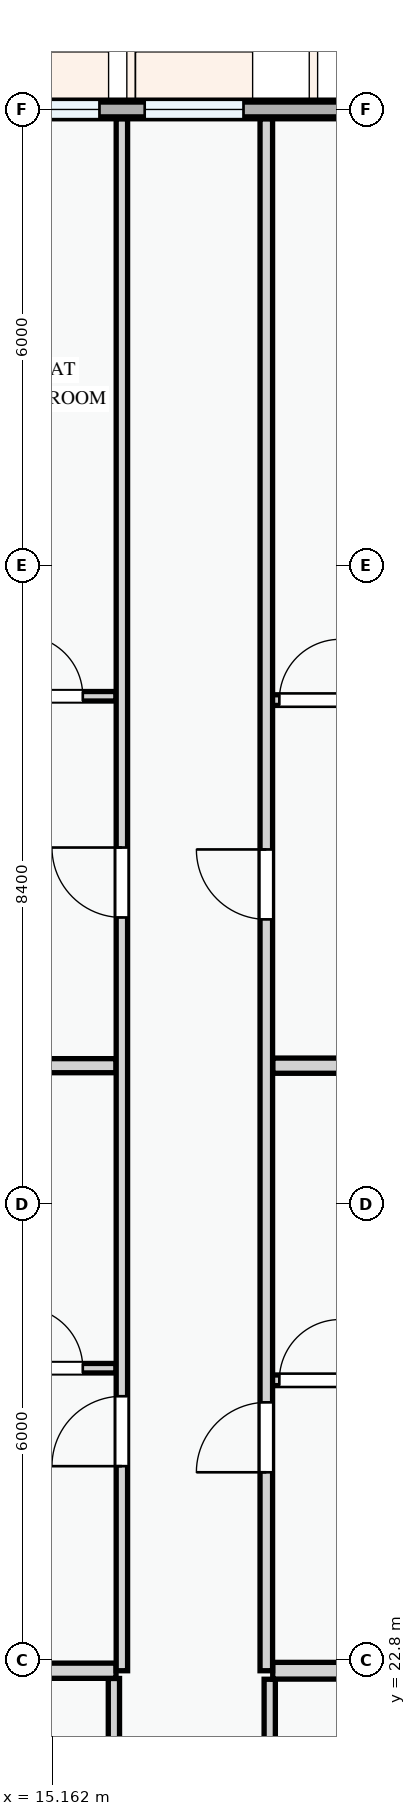
"""IFC4 building model, lengths in metres.
Left out: names, types, materials, properties, quantities, classifications, styles, units other than length and angle.
Written with IfcOpenShell. Run it as: python <this file> out.ifc"""

import sys

from ifc_helpers import new_model, si_unit, direction, frame, frame_2d, origin, place, context, subcontext, project, spatial, rectangle, extrude, element, fill, save


model = new_model("IFC4")
c1 = context("Model", 3, precision=1e-05, world=origin(), true_north=direction((0.0, 1.0)))
c2 = subcontext(c1, "Body", "Model", "MODEL_VIEW")
j1 = project(units=[si_unit("LENGTHUNIT", "METRE"), si_unit("PLANEANGLEUNIT", "RADIAN")], contexts=[c1])
p1 = place(None, origin())
s1 = spatial("IfcSite", under=j1, at=p1, CompositionType="ELEMENT")
p2 = place(p1, origin())
s2 = spatial("IfcBuilding", under=s1, at=p2, CompositionType="ELEMENT")
p3 = place(p2, frame((0.0, 0.0, 34.5)))
s3 = spatial("IfcBuildingStorey", under=s2, at=p3, CompositionType="ELEMENT", Elevation=34.5)
p4 = place(p3, frame((22.8, 43.2, 0.0), z_axis=(0.0, 0.0, 1.0), x_axis=(-1.0, 0.0, 0.0)))
e1 = element("IfcWall", 1, at=p4, inside=s3, PredefinedType="STANDARD", context=c2, shape_type="SweptSolid", body=[
    extrude(rectangle(XDim=8.4, YDim=0.245, at=frame_2d((4.2, 0.0))), origin(), (0.0, 0.0, 1.0), 2.375),
])
p5 = place(p4, frame((0.817, 0.0, 0.78)))
e2 = element("IfcOpeningElement", 2, at=p5, cuts=e1, PredefinedType="OPENING", context=c2, shape_type="SweptSolid", body=[
    extrude(rectangle(XDim=0.9, YDim=1.2, at=frame_2d((0.45, 0.6))), frame((0.0, 0.133, 0.0), z_axis=(0.0, -1.0, 0.0), x_axis=(1.0, 0.0, 0.0)), (0.0, 0.0, 1.0), 0.265),
])
p6 = place(p4, frame((5.12, 0.0, 0.78)))
e3 = element("IfcOpeningElement", 3, at=p6, cuts=e1, PredefinedType="OPENING", context=c2, shape_type="SweptSolid", body=[
    extrude(rectangle(XDim=1.3, YDim=1.4, at=frame_2d((0.65, 0.7))), frame((0.0, 0.133, 0.0), z_axis=(0.0, -1.0, 0.0), x_axis=(1.0, 0.0, 0.0)), (0.0, 0.0, 1.0), 0.265),
])
p7 = place(p4, frame((7.015, 0.0, 0.78)))
e4 = element("IfcOpeningElement", 4, at=p7, cuts=e1, PredefinedType="OPENING", context=c2, shape_type="SweptSolid", body=[
    extrude(rectangle(XDim=0.9, YDim=1.2, at=frame_2d((0.45, 0.6))), frame((0.0, 0.133, 0.0), z_axis=(0.0, -1.0, 0.0), x_axis=(1.0, 0.0, 0.0)), (0.0, 0.0, 1.0), 0.265),
])
p8 = place(p3, frame((22.8, 43.2, 3.3), z_axis=(0.0, 0.0, 1.0), x_axis=(-1.0, 0.0, 0.0)))
e5 = element("IfcWall", 5, at=p8, inside=s3, PredefinedType="PARAPET", context=c2, shape_type="SweptSolid", body=[
    extrude(rectangle(XDim=14.4, YDim=0.195, at=frame_2d((7.2, 0.0))), origin(), (0.0, 0.0, 1.0), 1.15),
])
p9 = place(p3, frame((15.975, 18.676, 0.0), z_axis=(0.0, 0.0, 1.0), x_axis=(0.0, 1.0, 0.0)))
e6 = element("IfcWall", 6, at=p9, inside=s3, PredefinedType="PARTITIONING", context=c2, shape_type="SweptSolid", body=[
    extrude(rectangle(XDim=3.882, YDim=0.148, at=frame_2d((1.941, 0.0))), origin(), (0.0, 0.0, 1.0), 3.0),
])
p10 = place(p3, frame((18.025, 18.676, 0.0), z_axis=(0.0, 0.0, 1.0), x_axis=(0.0, 1.0, 0.0)))
e7 = element("IfcWall", 7, at=p10, inside=s3, PredefinedType="PARTITIONING", context=c2, shape_type="SweptSolid", body=[
    extrude(rectangle(XDim=3.872, YDim=0.148, at=frame_2d((1.936, 0.0))), origin(), (0.0, 0.0, 1.0), 3.0),
])
p11 = place(p3, frame((8.524, 26.64, 0.0), z_axis=(0.0, 0.0, 1.0), x_axis=(1.0, 0.0, 0.0)))
e8 = element("IfcWall", 8, at=p11, inside=s3, PredefinedType="PARTITIONING", context=c2, shape_type="SweptSolid", body=[
    extrude(rectangle(XDim=7.479, YDim=0.125, at=frame_2d((3.739, 0.0))), origin(), (0.0, 0.0, 1.0), 3.0),
])
p12 = place(p11, frame((1.339, 0.0, 0.0)))
e9 = element("IfcOpeningElement", 9, at=p12, cuts=e8, PredefinedType="OPENING", context=c2, shape_type="SweptSolid", body=[
    extrude(rectangle(XDim=0.85, YDim=2.1, at=frame_2d((0.425, 1.05))), frame((0.0, 0.073, 0.0), z_axis=(0.0, -1.0, 0.0), x_axis=(1.0, 0.0, 0.0)), (0.0, 0.0, 1.0), 0.145),
])
p13 = place(p11, frame((4.235, 0.0, 0.0)))
e10 = element("IfcOpeningElement", 10, at=p13, cuts=e8, PredefinedType="OPENING", context=c2, shape_type="SweptSolid", body=[
    extrude(rectangle(XDim=0.85, YDim=2.1, at=frame_2d((0.425, 1.05))), frame((0.0, 0.073, 0.0), z_axis=(0.0, -1.0, 0.0), x_axis=(1.0, 0.0, 0.0)), (0.0, 0.0, 1.0), 0.145),
])
p14 = place(p11, frame((6.241, 0.0, 0.0)))
e11 = element("IfcOpeningElement", 11, at=p14, cuts=e8, PredefinedType="OPENING", context=c2, shape_type="SweptSolid", body=[
    extrude(rectangle(XDim=0.8, YDim=2.1, at=frame_2d((0.4, 1.05))), frame((0.0, 0.073, 0.0), z_axis=(0.0, -1.0, 0.0), x_axis=(1.0, 0.0, 0.0)), (0.0, 0.0, 1.0), 0.145),
])
p15 = place(p3, frame((17.98, 26.481, 0.0), z_axis=(0.0, 0.0, 1.0), x_axis=(1.0, 0.0, 0.0)))
e12 = element("IfcWall", 12, at=p15, inside=s3, PredefinedType="PARTITIONING", context=c2, shape_type="SweptSolid", body=[
    extrude(rectangle(XDim=4.696, YDim=0.14, at=frame_2d((2.348, 0.0))), origin(), (0.0, 0.0, 1.0), 3.0),
])
p16 = place(p15, frame((0.171, 0.0, 0.0)))
e13 = element("IfcOpeningElement", 13, at=p16, cuts=e12, PredefinedType="OPENING", context=c2, shape_type="SweptSolid", body=[
    extrude(rectangle(XDim=0.8, YDim=2.1, at=frame_2d((0.4, 1.05))), frame((0.0, 0.08, 0.0), z_axis=(0.0, -1.0, 0.0), x_axis=(1.0, 0.0, 0.0)), (0.0, 0.0, 1.0), 0.16),
])
p17 = place(p15, frame((1.384, 0.0, 0.0)))
e14 = element("IfcOpeningElement", 14, at=p17, cuts=e12, PredefinedType="OPENING", context=c2, shape_type="SweptSolid", body=[
    extrude(rectangle(XDim=0.85, YDim=2.1, at=frame_2d((0.425, 1.05))), frame((0.0, 0.08, 0.0), z_axis=(0.0, -1.0, 0.0), x_axis=(1.0, 0.0, 0.0)), (0.0, 0.0, 1.0), 0.16),
])
p18 = place(p15, frame((3.193, 0.0, 0.0)))
e15 = element("IfcOpeningElement", 15, at=p18, cuts=e12, PredefinedType="OPENING", context=c2, shape_type="SweptSolid", body=[
    extrude(rectangle(XDim=0.85, YDim=2.1, at=frame_2d((0.425, 1.05))), frame((0.0, 0.08, 0.0), z_axis=(0.0, -1.0, 0.0), x_axis=(1.0, 0.0, 0.0)), (0.0, 0.0, 1.0), 0.16),
])
p19 = place(p3, frame((8.524, 22.66, 0.0), z_axis=(0.0, 0.0, 1.0), x_axis=(1.0, 0.0, 0.0)))
e16 = element("IfcWall", 16, at=p19, inside=s3, PredefinedType="PARTITIONING", context=c2, shape_type="SweptSolid", body=[
    extrude(rectangle(XDim=7.479, YDim=0.2, at=frame_2d((3.739, 0.0))), origin(), (0.0, 0.0, 1.0), 2.375),
])
p20 = place(p3, frame((18.064, 22.66, 0.0), z_axis=(0.0, 0.0, 1.0), x_axis=(1.0, 0.0, 0.0)))
e17 = element("IfcWall", 17, at=p20, inside=s3, PredefinedType="PARTITIONING", context=c2, shape_type="SweptSolid", body=[
    extrude(rectangle(XDim=4.484, YDim=0.22, at=frame_2d((2.242, 0.0))), origin(), (0.0, 0.0, 1.0), 2.375),
])
p21 = place(p3, frame((8.524, 35.48, 0.0), z_axis=(0.0, 0.0, 1.0), x_axis=(1.0, 0.0, 0.0)))
e18 = element("IfcWall", 18, at=p21, inside=s3, PredefinedType="PARTITIONING", context=c2, shape_type="SweptSolid", body=[
    extrude(rectangle(XDim=7.479, YDim=0.125, at=frame_2d((3.739, 0.0))), origin(), (0.0, 0.0, 1.0), 3.0),
])
p22 = place(p21, frame((1.339, 0.0, 0.0)))
e19 = element("IfcOpeningElement", 19, at=p22, cuts=e18, PredefinedType="OPENING", context=c2, shape_type="SweptSolid", body=[
    extrude(rectangle(XDim=0.82, YDim=2.08, at=frame_2d((0.41, 1.04))), frame((0.0, 0.073, 0.0), z_axis=(0.0, -1.0, 0.0), x_axis=(1.0, 0.0, 0.0)), (0.0, 0.0, 1.0), 0.145),
])
p23 = place(p21, frame((4.235, 0.0, 0.0)))
e20 = element("IfcOpeningElement", 20, at=p23, cuts=e18, PredefinedType="OPENING", context=c2, shape_type="SweptSolid", body=[
    extrude(rectangle(XDim=0.85, YDim=2.1, at=frame_2d((0.425, 1.05))), frame((0.0, 0.073, 0.0), z_axis=(0.0, -1.0, 0.0), x_axis=(1.0, 0.0, 0.0)), (0.0, 0.0, 1.0), 0.145),
])
p24 = place(p21, frame((6.241, 0.0, 0.0)))
e21 = element("IfcOpeningElement", 21, at=p24, cuts=e18, PredefinedType="OPENING", context=c2, shape_type="SweptSolid", body=[
    extrude(rectangle(XDim=0.8, YDim=2.1, at=frame_2d((0.4, 1.05))), frame((0.0, 0.073, 0.0), z_axis=(0.0, -1.0, 0.0), x_axis=(1.0, 0.0, 0.0)), (0.0, 0.0, 1.0), 0.145),
])
p25 = place(p3, frame((17.98, 35.43, 0.0), z_axis=(0.0, 0.0, 1.0), x_axis=(1.0, 0.0, 0.0)))
e22 = element("IfcWall", 22, at=p25, inside=s3, PredefinedType="PARTITIONING", context=c2, shape_type="SweptSolid", body=[
    extrude(rectangle(XDim=4.696, YDim=0.14, at=frame_2d((2.348, 0.0))), origin(), (0.0, 0.0, 1.0), 3.0),
])
p26 = place(p25, frame((0.171, 0.0, 0.0)))
e23 = element("IfcOpeningElement", 23, at=p26, cuts=e22, PredefinedType="OPENING", context=c2, shape_type="SweptSolid", body=[
    extrude(rectangle(XDim=0.8, YDim=2.1, at=frame_2d((0.4, 1.05))), frame((0.0, 0.08, 0.0), z_axis=(0.0, -1.0, 0.0), x_axis=(1.0, 0.0, 0.0)), (0.0, 0.0, 1.0), 0.16),
])
p27 = place(p25, frame((1.384, 0.0, 0.0)))
e24 = element("IfcOpeningElement", 24, at=p27, cuts=e22, PredefinedType="OPENING", context=c2, shape_type="SweptSolid", body=[
    extrude(rectangle(XDim=0.82, YDim=2.08, at=frame_2d((0.41, 1.04))), frame((0.0, 0.08, 0.0), z_axis=(0.0, -1.0, 0.0), x_axis=(1.0, 0.0, 0.0)), (0.0, 0.0, 1.0), 0.16),
])
p28 = place(p25, frame((3.193, 0.0, 0.0)))
e25 = element("IfcOpeningElement", 25, at=p28, cuts=e22, PredefinedType="OPENING", context=c2, shape_type="SweptSolid", body=[
    extrude(rectangle(XDim=0.85, YDim=2.1, at=frame_2d((0.425, 1.05))), frame((0.0, 0.08, 0.0), z_axis=(0.0, -1.0, 0.0), x_axis=(1.0, 0.0, 0.0)), (0.0, 0.0, 1.0), 0.16),
])
p29 = place(p3, frame((8.524, 30.62, 0.0), z_axis=(0.0, 0.0, 1.0), x_axis=(1.0, 0.0, 0.0)))
e26 = element("IfcWall", 26, at=p29, inside=s3, PredefinedType="PARTITIONING", context=c2, shape_type="SweptSolid", body=[
    extrude(rectangle(XDim=7.479, YDim=0.185, at=frame_2d((3.739, 0.0))), origin(), (0.0, 0.0, 1.0), 3.0),
])
p30 = place(p3, frame((18.064, 30.62, 0.0), z_axis=(0.0, 0.0, 1.0), x_axis=(1.0, 0.0, 0.0)))
e27 = element("IfcWall", 27, at=p30, inside=s3, PredefinedType="PARTITIONING", context=c2, shape_type="SweptSolid", body=[
    extrude(rectangle(XDim=4.611, YDim=0.2, at=frame_2d((2.306, 0.0))), origin(), (0.0, 0.0, 1.0), 3.0),
])
p31 = place(p3, frame((16.08, 22.66, 0.0), z_axis=(0.0, 0.0, 1.0), x_axis=(0.0, 1.0, 0.0)))
e28 = element("IfcWall", 28, at=p31, inside=s3, PredefinedType="PARTITIONING", context=c2, shape_type="SweptSolid", body=[
    extrude(rectangle(XDim=20.416, YDim=0.15, at=frame_2d((10.208, 0.0))), origin(), (0.0, 0.0, 1.0), 3.0),
])
p32 = place(p31, frame((2.691, 0.0, 0.0)))
e29 = element("IfcOpeningElement", 29, at=p32, cuts=e28, PredefinedType="OPENING", context=c2, shape_type="SweptSolid", body=[
    extrude(rectangle(XDim=0.92, YDim=2.1, at=frame_2d((0.46, 1.05))), frame((0.0, 0.085, 0.0), z_axis=(0.0, -1.0, 0.0), x_axis=(1.0, 0.0, 0.0)), (0.0, 0.0, 1.0), 0.17),
])
p33 = place(p31, frame((9.91, 0.0, 0.0)))
e30 = element("IfcOpeningElement", 30, at=p33, cuts=e28, PredefinedType="OPENING", context=c2, shape_type="SweptSolid", body=[
    extrude(rectangle(XDim=0.92, YDim=2.1, at=frame_2d((0.46, 1.05))), frame((0.0, 0.085, 0.0), z_axis=(0.0, -1.0, 0.0), x_axis=(1.0, 0.0, 0.0)), (0.0, 0.0, 1.0), 0.17),
])
p34 = place(p3, frame((17.98, 22.66, 0.0), z_axis=(0.0, 0.0, 1.0), x_axis=(0.0, 1.0, 0.0)))
e31 = element("IfcWall", 31, at=p34, inside=s3, PredefinedType="PARTITIONING", context=c2, shape_type="SweptSolid", body=[
    extrude(rectangle(XDim=20.416, YDim=0.165, at=frame_2d((10.208, 0.0))), origin(), (0.0, 0.0, 1.0), 3.0),
])
p35 = place(p34, frame((2.611, 0.0, 0.0)))
e32 = element("IfcOpeningElement", 32, at=p35, cuts=e31, PredefinedType="OPENING", context=c2, shape_type="SweptSolid", body=[
    extrude(rectangle(XDim=0.92, YDim=2.1, at=frame_2d((0.46, 1.05))), frame((0.0, 0.093, 0.0), z_axis=(0.0, -1.0, 0.0), x_axis=(1.0, 0.0, 0.0)), (0.0, 0.0, 1.0), 0.185),
])
p36 = place(p34, frame((9.885, 0.0, 0.0)))
e33 = element("IfcOpeningElement", 33, at=p36, cuts=e31, PredefinedType="OPENING", context=c2, shape_type="SweptSolid", body=[
    extrude(rectangle(XDim=0.92, YDim=2.1, at=frame_2d((0.46, 1.05))), frame((0.0, 0.093, 0.0), z_axis=(0.0, -1.0, 0.0), x_axis=(1.0, 0.0, 0.0)), (0.0, 0.0, 1.0), 0.185),
])
p37 = place(p6, origin())
e34 = element("IfcWindow", 34, at=p37, inside=s3, PartitioningType="SINGLE_PANEL", PredefinedType="WINDOW", context=c2, shape_type="SweptSolid", body=[
    extrude(rectangle(XDim=1.3, YDim=1.4, at=frame_2d((0.65, 0.7))), frame((0.0, 0.03, 0.0), z_axis=(0.0, -1.0, 0.0), x_axis=(1.0, 0.0, 0.0)), (0.0, 0.0, 1.0), 0.06),
])
fill(e3, e34)
p38 = place(p7, origin())
e35 = element("IfcWindow", 35, at=p38, inside=s3, PartitioningType="SINGLE_PANEL", PredefinedType="WINDOW", context=c2, shape_type="SweptSolid", body=[
    extrude(rectangle(XDim=0.9, YDim=1.2, at=frame_2d((0.45, 0.6))), frame((0.0, 0.03, 0.0), z_axis=(0.0, -1.0, 0.0), x_axis=(1.0, 0.0, 0.0)), (0.0, 0.0, 1.0), 0.06),
])
fill(e4, e35)
p39 = place(p14, origin())
e36 = element("IfcDoor", 36, at=p39, inside=s3, OperationType="SINGLE_SWING_LEFT", PredefinedType="DOOR", context=c2, shape_type="SweptSolid", body=[
    extrude(rectangle(XDim=0.8, YDim=2.1, at=frame_2d((0.4, 1.05))), frame((0.0, 0.025, 0.0), z_axis=(0.0, -1.0, 0.0), x_axis=(1.0, 0.0, 0.0)), (0.0, 0.0, 1.0), 0.05),
])
fill(e11, e36)
p40 = place(p16, origin())
e37 = element("IfcDoor", 37, at=p40, inside=s3, OperationType="SINGLE_SWING_RIGHT", PredefinedType="DOOR", context=c2, shape_type="SweptSolid", body=[
    extrude(rectangle(XDim=0.8, YDim=2.1, at=frame_2d((0.4, 1.05))), frame((0.0, 0.025, 0.0), z_axis=(0.0, -1.0, 0.0), x_axis=(1.0, 0.0, 0.0)), (0.0, 0.0, 1.0), 0.05),
])
fill(e13, e37)
p41 = place(p24, origin())
e38 = element("IfcDoor", 38, at=p41, inside=s3, OperationType="SINGLE_SWING_LEFT", PredefinedType="DOOR", context=c2, shape_type="SweptSolid", body=[
    extrude(rectangle(XDim=0.8, YDim=2.1, at=frame_2d((0.4, 1.05))), frame((0.0, 0.025, 0.0), z_axis=(0.0, -1.0, 0.0), x_axis=(1.0, 0.0, 0.0)), (0.0, 0.0, 1.0), 0.05),
])
fill(e21, e38)
p42 = place(p26, origin())
e39 = element("IfcDoor", 39, at=p42, inside=s3, OperationType="SINGLE_SWING_RIGHT", PredefinedType="DOOR", context=c2, shape_type="SweptSolid", body=[
    extrude(rectangle(XDim=0.8, YDim=2.1, at=frame_2d((0.4, 1.05))), frame((0.0, 0.025, 0.0), z_axis=(0.0, -1.0, 0.0), x_axis=(1.0, 0.0, 0.0)), (0.0, 0.0, 1.0), 0.05),
])
fill(e23, e39)
p43 = place(p32, origin())
e40 = element("IfcDoor", 40, at=p43, inside=s3, OperationType="SINGLE_SWING_LEFT", PredefinedType="DOOR", context=c2, shape_type="SweptSolid", body=[
    extrude(rectangle(XDim=0.92, YDim=2.1, at=frame_2d((0.46, 1.05))), frame((0.0, 0.025, 0.0), z_axis=(0.0, -1.0, 0.0), x_axis=(1.0, 0.0, 0.0)), (0.0, 0.0, 1.0), 0.05),
])
fill(e29, e40)
p44 = place(p33, origin())
e41 = element("IfcDoor", 41, at=p44, inside=s3, OperationType="SINGLE_SWING_RIGHT", PredefinedType="DOOR", context=c2, shape_type="SweptSolid", body=[
    extrude(rectangle(XDim=0.92, YDim=2.1, at=frame_2d((0.46, 1.05))), frame((0.0, 0.025, 0.0), z_axis=(0.0, -1.0, 0.0), x_axis=(1.0, 0.0, 0.0)), (0.0, 0.0, 1.0), 0.05),
])
fill(e30, e41)
p45 = place(p35, origin())
e42 = element("IfcDoor", 42, at=p45, inside=s3, OperationType="SINGLE_SWING_LEFT", PredefinedType="DOOR", context=c2, shape_type="SweptSolid", body=[
    extrude(rectangle(XDim=0.92, YDim=2.1, at=frame_2d((0.46, 1.05))), frame((0.0, 0.025, 0.0), z_axis=(0.0, -1.0, 0.0), x_axis=(1.0, 0.0, 0.0)), (0.0, 0.0, 1.0), 0.05),
])
fill(e32, e42)
p46 = place(p36, origin())
e43 = element("IfcDoor", 43, at=p46, inside=s3, OperationType="SINGLE_SWING_RIGHT", PredefinedType="DOOR", context=c2, shape_type="SweptSolid", body=[
    extrude(rectangle(XDim=0.92, YDim=2.1, at=frame_2d((0.46, 1.05))), frame((0.0, 0.025, 0.0), z_axis=(0.0, -1.0, 0.0), x_axis=(1.0, 0.0, 0.0)), (0.0, 0.0, 1.0), 0.05),
])
fill(e33, e43)
save(model, sys.argv[1])
